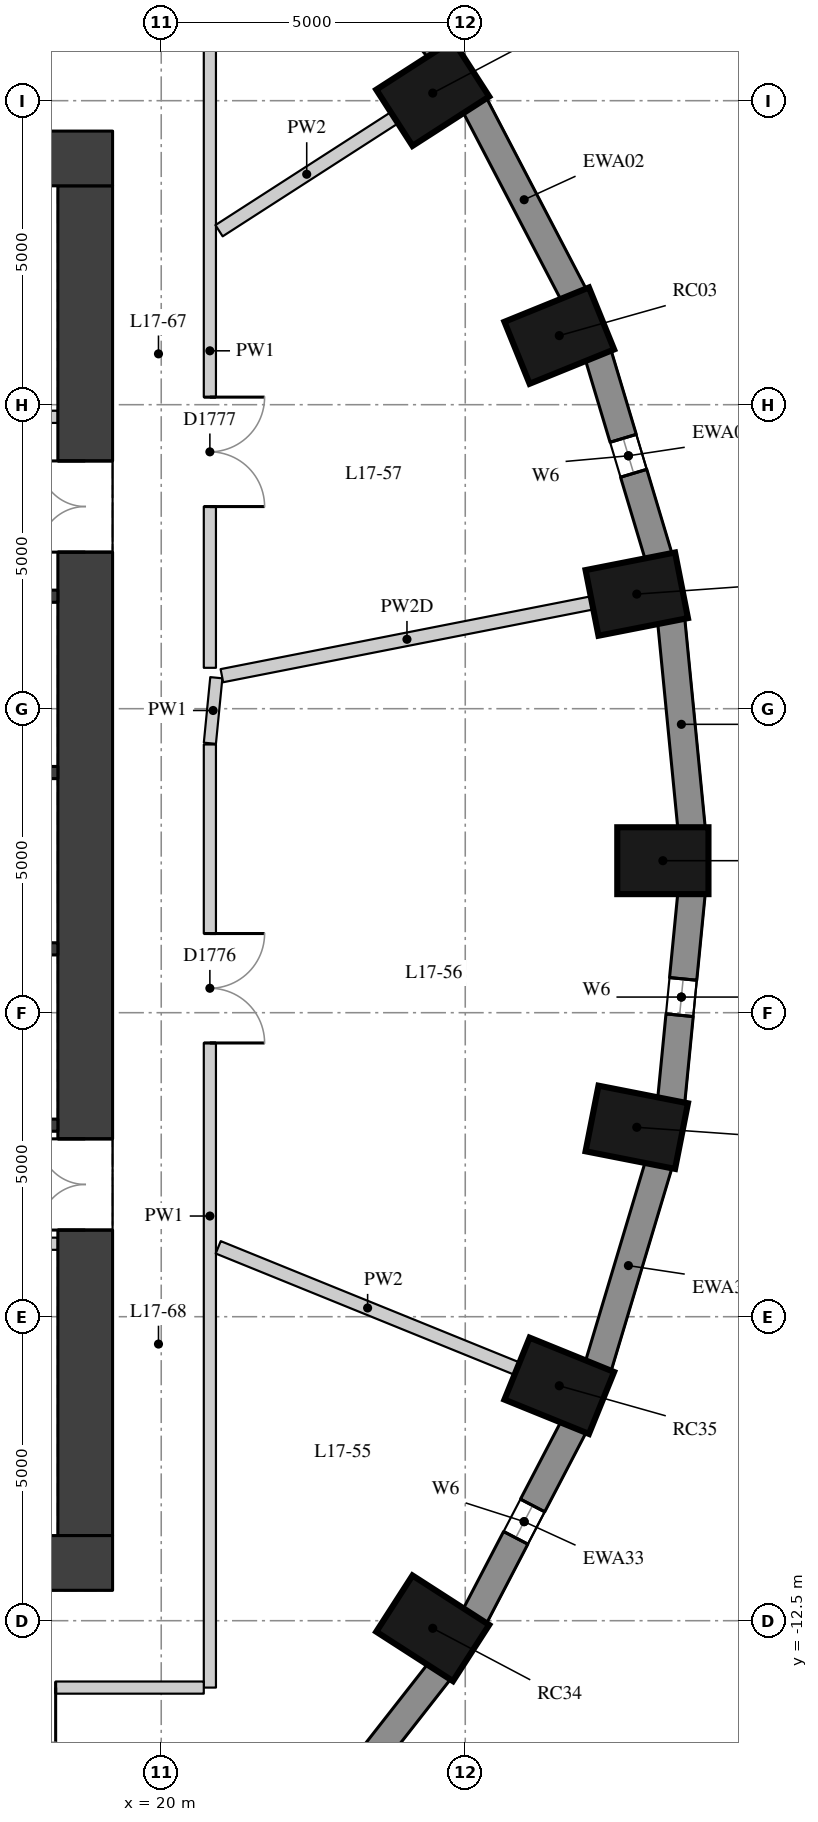
"""IFC4 building model, lengths in metres.
Left out: names, types, materials, properties, quantities, classifications, styles, units other than length and angle.
Written with IfcOpenShell. Run it as: python <this file> out.ifc"""

import sys

from ifc_helpers import new_model, si_unit, direction, frame, frame_2d, origin, origin_2d, place, context, subcontext, project, spatial, rectangle, extrude, element, fill, save


model = new_model("IFC4")
c1 = context("Model", 3, precision=1e-05, world=origin(), true_north=direction((0.0, 1.0)))
c2 = subcontext(c1, "Body", "Model", "MODEL_VIEW")
j1 = project(units=[si_unit("LENGTHUNIT", "METRE"), si_unit("PLANEANGLEUNIT", "RADIAN")], contexts=[c1])
p1 = place(None, origin())
s1 = spatial("IfcSite", under=j1, at=p1, CompositionType="ELEMENT")
p2 = place(p1, origin())
s2 = spatial("IfcBuilding", under=s1, at=p2, CompositionType="ELEMENT")
p3 = place(p2, frame((0.0, 0.0, 64.6)))
s3 = spatial("IfcBuildingStorey", under=s2, at=p3, CompositionType="ELEMENT", Elevation=64.6)
for number, where, z_axis, x_axis in (
    (1, (28.25, 0.0, 0.0), (0.0, 0.0, 1.0), (1.0, 0.0, 0.0)),
    (2, (27.821, 4.385, 0.0), (0.0, 0.0, 1.0), (0.981, 0.193, 0.0)),
    (3, (26.546, 8.636, 0.0), (0.0, 0.0, 1.0), (0.927, 0.376, 0.0)),
    (4, (24.465, 12.625, 0.0), (0.0, 0.0, 1.0), (0.841, 0.541, 0.0)),
    (5, (24.465, -12.625, 0.0), (0.0, 0.0, 1.0), (0.841, -0.541, 0.0)),
    (6, (26.546, -8.636, 0.0), (0.0, 0.0, 1.0), (0.927, -0.376, 0.0)),
    (7, (27.821, -4.385, 0.0), (0.0, 0.0, 1.0), (0.981, -0.193, 0.0)),
):
    element("IfcColumn", number, at=place(p3, frame(where, z_axis=z_axis, x_axis=x_axis)), inside=s3, PredefinedType="COLUMN", context=c2, shape_type="SweptSolid", body=[
        extrude(rectangle(XDim=1.5, YDim=1.1, at=origin_2d()), origin(), (0.0, 0.0, 1.0), 3.3),
    ])
p4 = place(p3, frame((28.722, 0.53, 0.0), z_axis=(0.0, 0.0, 1.0), x_axis=(-0.097389581596, 0.995246336038, 0.0)))
e8 = element("IfcWall", 8, at=p4, inside=s3, PredefinedType="SOLIDWALL", context=c2, shape_type="SweptSolid", body=[
    extrude(rectangle(XDim=3.442, YDim=0.45, at=frame_2d((1.721, 0.0))), origin(), (0.0, 0.0, 1.0), 3.02),
])
p5 = place(p3, frame((28.182, 4.996, 0.0), z_axis=(0.0, 0.0, 1.0), x_axis=(-0.287064133733, 0.957911364963, 0.0)))
e9 = element("IfcWall", 9, at=p5, inside=s3, PredefinedType="SOLIDWALL", context=c2, shape_type="SweptSolid", body=[
    extrude(rectangle(XDim=3.473, YDim=0.45, at=frame_2d((1.737, 0.0))), origin(), (0.0, 0.0, 1.0), 3.02),
])
p6 = place(p5, frame((1.437, 0.0, 0.4)))
e10 = element("IfcOpeningElement", 10, at=p6, cuts=e9, PredefinedType="OPENING", context=c2, shape_type="SweptSolid", body=[
    extrude(rectangle(XDim=0.6, YDim=1.75, at=frame_2d((0.3, 0.875))), frame((0.0, 0.235, 0.0), z_axis=(0.0, -1.0, 0.0), x_axis=(1.0, 0.0, 0.0)), (0.0, 0.0, 1.0), 0.47),
])
p7 = place(p3, frame((26.786, 9.305, 0.0), z_axis=(0.0, 0.0, 1.0), x_axis=(-0.462492775226, 0.886623050041, 0.0)))
e11 = element("IfcWall", 11, at=p7, inside=s3, PredefinedType="SOLIDWALL", context=c2, shape_type="SweptSolid", body=[
    extrude(rectangle(XDim=3.532, YDim=0.45, at=frame_2d((1.766, 0.0))), origin(), (0.0, 0.0, 1.0), 3.02),
])
p8 = place(p3, frame((24.578, 13.328, 0.0), z_axis=(0.0, 0.0, 1.0), x_axis=(-0.616661975264, 0.787228053529, 0.0)))
e12 = element("IfcWall", 12, at=p8, inside=s3, PredefinedType="SOLIDWALL", context=c2, shape_type="SweptSolid", body=[
    extrude(rectangle(XDim=3.61, YDim=0.45, at=frame_2d((1.805, 0.0))), origin(), (0.0, 0.0, 1.0), 3.02),
])
p9 = place(p8, frame((1.505, 0.0, 0.4)))
e13 = element("IfcOpeningElement", 13, at=p9, cuts=e12, PredefinedType="OPENING", context=c2, shape_type="SweptSolid", body=[
    extrude(rectangle(XDim=0.6, YDim=1.75, at=frame_2d((0.3, 0.875))), frame((0.0, 0.235, 0.0), z_axis=(0.0, -1.0, 0.0), x_axis=(1.0, 0.0, 0.0)), (0.0, 0.0, 1.0), 0.47),
])
p10 = place(p3, frame((22.352, -16.17, 0.0), z_axis=(0.0, 0.0, 1.0), x_axis=(0.616661975264, 0.787228053529, 0.0)))
e14 = element("IfcWall", 14, at=p10, inside=s3, PredefinedType="SOLIDWALL", context=c2, shape_type="SweptSolid", body=[
    extrude(rectangle(XDim=3.61, YDim=0.45, at=frame_2d((1.805, 0.0))), origin(), (0.0, 0.0, 1.0), 3.02),
])
p11 = place(p3, frame((25.152, -12.437, 0.0), z_axis=(0.0, 0.0, 1.0), x_axis=(0.462492775226, 0.886623050041, 0.0)))
e15 = element("IfcWall", 15, at=p11, inside=s3, PredefinedType="SOLIDWALL", context=c2, shape_type="SweptSolid", body=[
    extrude(rectangle(XDim=3.532, YDim=0.45, at=frame_2d((1.766, 0.0))), origin(), (0.0, 0.0, 1.0), 3.02),
])
p12 = place(p11, frame((1.466, 0.0, 0.4)))
e16 = element("IfcOpeningElement", 16, at=p12, cuts=e15, PredefinedType="OPENING", context=c2, shape_type="SweptSolid", body=[
    extrude(rectangle(XDim=0.6, YDim=1.75, at=frame_2d((0.3, 0.875))), frame((0.0, 0.235, 0.0), z_axis=(0.0, -1.0, 0.0), x_axis=(1.0, 0.0, 0.0)), (0.0, 0.0, 1.0), 0.47),
])
p13 = place(p3, frame((27.185, -8.323, 0.0), z_axis=(0.0, 0.0, 1.0), x_axis=(0.287064133733, 0.957911364963, 0.0)))
e17 = element("IfcWall", 17, at=p13, inside=s3, PredefinedType="SOLIDWALL", context=c2, shape_type="SweptSolid", body=[
    extrude(rectangle(XDim=3.473, YDim=0.45, at=frame_2d((1.737, 0.0))), origin(), (0.0, 0.0, 1.0), 3.02),
])
p14 = place(p3, frame((28.387, -3.956, 0.0), z_axis=(0.0, 0.0, 1.0), x_axis=(0.097389581596, 0.995246336038, 0.0)))
e18 = element("IfcWall", 18, at=p14, inside=s3, PredefinedType="SOLIDWALL", context=c2, shape_type="SweptSolid", body=[
    extrude(rectangle(XDim=3.442, YDim=0.45, at=frame_2d((1.721, 0.0))), origin(), (0.0, 0.0, 1.0), 3.02),
])
p15 = place(p14, frame((1.421, 0.0, 0.4)))
e19 = element("IfcOpeningElement", 19, at=p15, cuts=e18, PredefinedType="OPENING", context=c2, shape_type="SweptSolid", body=[
    extrude(rectangle(XDim=0.6, YDim=1.75, at=frame_2d((0.3, 0.875))), frame((0.0, 0.235, 0.0), z_axis=(0.0, -1.0, 0.0), x_axis=(1.0, 0.0, 0.0)), (0.0, 0.0, 1.0), 0.47),
])
p16 = place(p3, frame((18.75, -11.1, 0.0), z_axis=(0.0, 0.0, 1.0), x_axis=(0.0, 1.0, 0.0)))
e20 = element("IfcWall", 20, at=p16, inside=s3, PredefinedType="SHEAR", context=c2, shape_type="SweptSolid", body=[
    extrude(rectangle(XDim=22.2, YDim=0.9, at=frame_2d((11.1, 0.0))), origin(), (0.0, 0.0, 1.0), 3.02),
])
p17 = place(p16, frame((16.175, 0.0, 0.0)))
e21 = element("IfcOpeningElement", 21, at=p17, cuts=e20, PredefinedType="OPENING", context=c2, shape_type="SweptSolid", body=[
    extrude(rectangle(XDim=1.5, YDim=2.1, at=frame_2d((0.75, 1.05))), frame((0.0, 0.46, 0.0), z_axis=(0.0, -1.0, 0.0), x_axis=(1.0, 0.0, 0.0)), (0.0, 0.0, 1.0), 0.92),
])
p18 = place(p16, frame((5.025, 0.0, 0.0)))
e22 = element("IfcOpeningElement", 22, at=p18, cuts=e20, PredefinedType="OPENING", context=c2, shape_type="SweptSolid", body=[
    extrude(rectangle(XDim=1.5, YDim=2.1, at=frame_2d((0.75, 1.05))), frame((0.0, 0.46, 0.0), z_axis=(0.0, -1.0, 0.0), x_axis=(1.0, 0.0, 0.0)), (0.0, 0.0, 1.0), 0.92),
])
for number, where, z_axis, x_axis in (
    (23, (4.0, 11.55, 0.0), (0.0, 0.0, 1.0), (1.0, 0.0, 0.0)),
    (24, (4.0, -11.55, 0.0), (0.0, 0.0, 1.0), (1.0, 0.0, 0.0)),
):
    element("IfcWall", number, at=place(p3, frame(where, z_axis=z_axis, x_axis=x_axis)), inside=s3, PredefinedType="SHEAR", context=c2, shape_type="SweptSolid", body=[
        extrude(rectangle(XDim=15.2, YDim=0.9, at=frame_2d((7.6, 0.0))), origin(), (0.0, 0.0, 1.0), 3.02),
    ])
for number, where, z_axis, x_axis in (
    (25, (16.0, -4.35, 0.0), (0.0, 0.0, 1.0), (1.0, 0.0, 0.0)),
    (26, (16.0, -1.45, 0.0), (0.0, 0.0, 1.0), (1.0, 0.0, 0.0)),
    (27, (16.0, 1.45, 0.0), (0.0, 0.0, 1.0), (1.0, 0.0, 0.0)),
    (28, (16.0, 4.35, 0.0), (0.0, 0.0, 1.0), (1.0, 0.0, 0.0)),
):
    element("IfcWall", number, at=place(p3, frame(where, z_axis=z_axis, x_axis=x_axis)), inside=s3, PredefinedType="SHEAR", context=c2, shape_type="SweptSolid", body=[
        extrude(rectangle(XDim=2.3, YDim=0.2, at=frame_2d((1.15, 0.0))), origin(), (0.0, 0.0, 1.0), 3.02),
    ])
p19 = place(p3, frame((16.0, 7.3, 0.0), z_axis=(0.0, 0.0, 1.0), x_axis=(1.0, 0.0, 0.0)))
e29 = element("IfcWall", 29, at=p19, inside=s3, PredefinedType="PARTITIONING", context=c2, shape_type="SweptSolid", body=[
    extrude(rectangle(XDim=2.3, YDim=0.2, at=frame_2d((1.15, 0.0))), origin(), (0.0, 0.0, 1.0), 3.02),
])
p20 = place(p19, frame((0.2, 0.0, 0.0)))
e30 = element("IfcOpeningElement", 30, at=p20, cuts=e29, PredefinedType="OPENING", context=c2, shape_type="SweptSolid", body=[
    extrude(rectangle(XDim=0.9, YDim=2.1, at=frame_2d((0.45, 1.05))), frame((0.0, 0.11, 0.0), z_axis=(0.0, -1.0, 0.0), x_axis=(1.0, 0.0, 0.0)), (0.0, 0.0, 1.0), 0.22),
])
p21 = place(p3, frame((16.0, -6.3, 0.0), z_axis=(0.0, 0.0, 1.0), x_axis=(1.0, 0.0, 0.0)))
e31 = element("IfcWall", 31, at=p21, inside=s3, PredefinedType="PARTITIONING", context=c2, shape_type="SweptSolid", body=[
    extrude(rectangle(XDim=2.3, YDim=0.2, at=frame_2d((1.15, 0.0))), origin(), (0.0, 0.0, 1.0), 3.02),
])
p22 = place(p21, frame((0.1, 0.0, 0.0)))
e32 = element("IfcOpeningElement", 32, at=p22, cuts=e31, PredefinedType="OPENING", context=c2, shape_type="SweptSolid", body=[
    extrude(rectangle(XDim=0.9, YDim=2.1, at=frame_2d((0.45, 1.05))), frame((0.0, 0.11, 0.0), z_axis=(0.0, -1.0, 0.0), x_axis=(1.0, 0.0, 0.0)), (0.0, 0.0, 1.0), 0.22),
])
p23 = place(p3, frame((20.8, 13.6, 0.0), z_axis=(0.0, 0.0, 1.0), x_axis=(0.0, -1.0, 0.0)))
e33 = element("IfcWall", 33, at=p23, inside=s3, PredefinedType="PARTITIONING", context=c2, shape_type="SweptSolid", body=[
    extrude(rectangle(XDim=10.428, YDim=0.2, at=frame_2d((5.214, 0.0))), origin(), (0.0, 0.0, 1.0), 3.02),
])
p24 = place(p23, frame((5.976, 0.0, 0.0)))
e34 = element("IfcOpeningElement", 34, at=p24, cuts=e33, PredefinedType="OPENING", context=c2, shape_type="SweptSolid", body=[
    extrude(rectangle(XDim=1.8, YDim=2.1, at=frame_2d((0.9, 1.05))), frame((0.0, 0.11, 0.0), z_axis=(0.0, -1.0, 0.0), x_axis=(1.0, 0.0, 0.0)), (0.0, 0.0, 1.0), 0.22),
])
p25 = place(p3, frame((20.906, 3.01, 0.0), z_axis=(0.0, 0.0, 1.0), x_axis=(-0.09782971129, -0.995203169001, 0.0)))
e35 = element("IfcWall", 35, at=p25, inside=s3, PredefinedType="PARTITIONING", context=c2, shape_type="SweptSolid", body=[
    extrude(rectangle(XDim=1.083, YDim=0.2, at=frame_2d((0.542, 0.0))), origin(), (0.0, 0.0, 1.0), 3.02),
])
p26 = place(p3, frame((20.8, 1.912, 0.0), z_axis=(0.0, 0.0, 1.0), x_axis=(0.0, -1.0, 0.0)))
e36 = element("IfcWall", 36, at=p26, inside=s3, PredefinedType="PARTITIONING", context=c2, shape_type="SweptSolid", body=[
    extrude(rectangle(XDim=15.512, YDim=0.2, at=frame_2d((7.756, 0.0))), origin(), (0.0, 0.0, 1.0), 3.02),
])
p27 = place(p26, frame((3.11, 0.0, 0.0)))
e37 = element("IfcOpeningElement", 37, at=p27, cuts=e36, PredefinedType="OPENING", context=c2, shape_type="SweptSolid", body=[
    extrude(rectangle(XDim=1.8, YDim=2.1, at=frame_2d((0.9, 1.05))), frame((0.0, 0.11, 0.0), z_axis=(0.0, -1.0, 0.0), x_axis=(1.0, 0.0, 0.0)), (0.0, 0.0, 1.0), 0.22),
])
p28 = place(p3, frame((20.7, -13.6, 0.0), z_axis=(0.0, 0.0, 1.0), x_axis=(-1.0, 0.0, 0.0)))
e38 = element("IfcWall", 38, at=p28, inside=s3, PredefinedType="PARTITIONING", context=c2, shape_type="SweptSolid", body=[
    extrude(rectangle(XDim=9.331, YDim=0.2, at=frame_2d((4.666, 0.0))), origin(), (0.0, 0.0, 1.0), 3.02),
])
p29 = place(p28, frame((2.436, 0.0, 0.0)))
e39 = element("IfcOpeningElement", 39, at=p29, cuts=e38, PredefinedType="OPENING", context=c2, shape_type="SweptSolid", body=[
    extrude(rectangle(XDim=1.8, YDim=2.1, at=frame_2d((0.9, 1.05))), frame((0.0, 0.11, 0.0), z_axis=(0.0, -1.0, 0.0), x_axis=(1.0, 0.0, 0.0)), (0.0, 0.0, 1.0), 0.22),
])
p30 = place(p3, frame((27.085, 4.24, 0.0), z_axis=(0.0, 0.0, 1.0), x_axis=(-0.981208260902, -0.192951674616, 0.0)))
e40 = element("IfcWall", 40, at=p30, inside=s3, PredefinedType="PARTITIONING", context=c2, shape_type="SweptSolid", body=[
    extrude(rectangle(XDim=6.204, YDim=0.22, at=frame_2d((3.102, 0.0))), origin(), (0.0, 0.0, 1.0), 2.47),
])
p31 = place(p3, frame((23.835, 12.219, 0.0), z_axis=(0.0, 0.0, 1.0), x_axis=(-0.840694872373, -0.541509124176, 0.0)))
e41 = element("IfcWall", 41, at=p31, inside=s3, PredefinedType="PARTITIONING", context=c2, shape_type="SweptSolid", body=[
    extrude(rectangle(XDim=3.43, YDim=0.22, at=frame_2d((1.715, 0.0))), origin(), (0.0, 0.0, 1.0), 3.02),
])
p32 = place(p3, frame((25.851, -8.354, 0.0), z_axis=(0.0, 0.0, 1.0), x_axis=(-0.926546814299, 0.376179479653, 0.0)))
e42 = element("IfcWall", 42, at=p32, inside=s3, PredefinedType="PARTITIONING", context=c2, shape_type="SweptSolid", body=[
    extrude(rectangle(XDim=5.304, YDim=0.22, at=frame_2d((2.652, 0.0))), origin(), (0.0, 0.0, 1.0), 3.02),
])
p33 = place(p6, origin())
e43 = element("IfcWindow", 43, at=p33, inside=s3, PartitioningType="SINGLE_PANEL", PredefinedType="WINDOW", context=c2, shape_type="SweptSolid", body=[
    extrude(rectangle(XDim=0.6, YDim=1.75, at=frame_2d((0.3, 0.875))), frame((0.0, 0.035, 0.0), z_axis=(0.0, -1.0, 0.0), x_axis=(1.0, 0.0, 0.0)), (0.0, 0.0, 1.0), 0.06),
])
fill(e10, e43)
p34 = place(p12, origin())
e44 = element("IfcWindow", 44, at=p34, inside=s3, PartitioningType="SINGLE_PANEL", PredefinedType="WINDOW", context=c2, shape_type="SweptSolid", body=[
    extrude(rectangle(XDim=0.6, YDim=1.75, at=frame_2d((0.3, 0.875))), frame((0.0, 0.035, 0.0), z_axis=(0.0, -1.0, 0.0), x_axis=(1.0, 0.0, 0.0)), (0.0, 0.0, 1.0), 0.06),
])
fill(e16, e44)
p35 = place(p15, origin())
e45 = element("IfcWindow", 45, at=p35, inside=s3, PartitioningType="SINGLE_PANEL", PredefinedType="WINDOW", context=c2, shape_type="SweptSolid", body=[
    extrude(rectangle(XDim=0.6, YDim=1.75, at=frame_2d((0.3, 0.875))), frame((0.0, 0.035, 0.0), z_axis=(0.0, -1.0, 0.0), x_axis=(1.0, 0.0, 0.0)), (0.0, 0.0, 1.0), 0.06),
])
fill(e19, e45)
p36 = place(p17, origin())
e46 = element("IfcDoor", 46, at=p36, inside=s3, OperationType="DOUBLE_DOOR_SINGLE_SWING", PredefinedType="DOOR", context=c2, shape_type="SweptSolid", body=[
    extrude(rectangle(XDim=1.5, YDim=2.1, at=frame_2d((0.75, 1.05))), frame((0.0, 0.025, 0.0), z_axis=(0.0, -1.0, 0.0), x_axis=(1.0, 0.0, 0.0)), (0.0, 0.0, 1.0), 0.05),
])
fill(e21, e46)
p37 = place(p18, origin())
e47 = element("IfcDoor", 47, at=p37, inside=s3, OperationType="DOUBLE_DOOR_SINGLE_SWING", PredefinedType="DOOR", context=c2, shape_type="SweptSolid", body=[
    extrude(rectangle(XDim=1.5, YDim=2.1, at=frame_2d((0.75, 1.05))), frame((0.0, 0.025, 0.0), z_axis=(0.0, -1.0, 0.0), x_axis=(1.0, 0.0, 0.0)), (0.0, 0.0, 1.0), 0.05),
])
fill(e22, e47)
p38 = place(p29, origin())
e48 = element("IfcDoor", 48, at=p38, inside=s3, OperationType="DOUBLE_DOOR_SINGLE_SWING", PredefinedType="DOOR", context=c2, shape_type="SweptSolid", body=[
    extrude(rectangle(XDim=1.8, YDim=2.1, at=frame_2d((0.9, 1.05))), frame((0.0, 0.025, 0.0), z_axis=(0.0, -1.0, 0.0), x_axis=(1.0, 0.0, 0.0)), (0.0, 0.0, 1.0), 0.05),
])
fill(e39, e48)
p39 = place(p27, origin())
e49 = element("IfcDoor", 49, at=p39, inside=s3, OperationType="DOUBLE_DOOR_SINGLE_SWING", PredefinedType="DOOR", context=c2, shape_type="SweptSolid", body=[
    extrude(rectangle(XDim=1.8, YDim=2.1, at=frame_2d((0.9, 1.05))), frame((0.0, 0.025, 0.0), z_axis=(0.0, -1.0, 0.0), x_axis=(1.0, 0.0, 0.0)), (0.0, 0.0, 1.0), 0.05),
])
fill(e37, e49)
p40 = place(p24, origin())
e50 = element("IfcDoor", 50, at=p40, inside=s3, OperationType="DOUBLE_DOOR_SINGLE_SWING", PredefinedType="DOOR", context=c2, shape_type="SweptSolid", body=[
    extrude(rectangle(XDim=1.8, YDim=2.1, at=frame_2d((0.9, 1.05))), frame((0.0, 0.025, 0.0), z_axis=(0.0, -1.0, 0.0), x_axis=(1.0, 0.0, 0.0)), (0.0, 0.0, 1.0), 0.05),
])
fill(e34, e50)
save(model, sys.argv[1])
